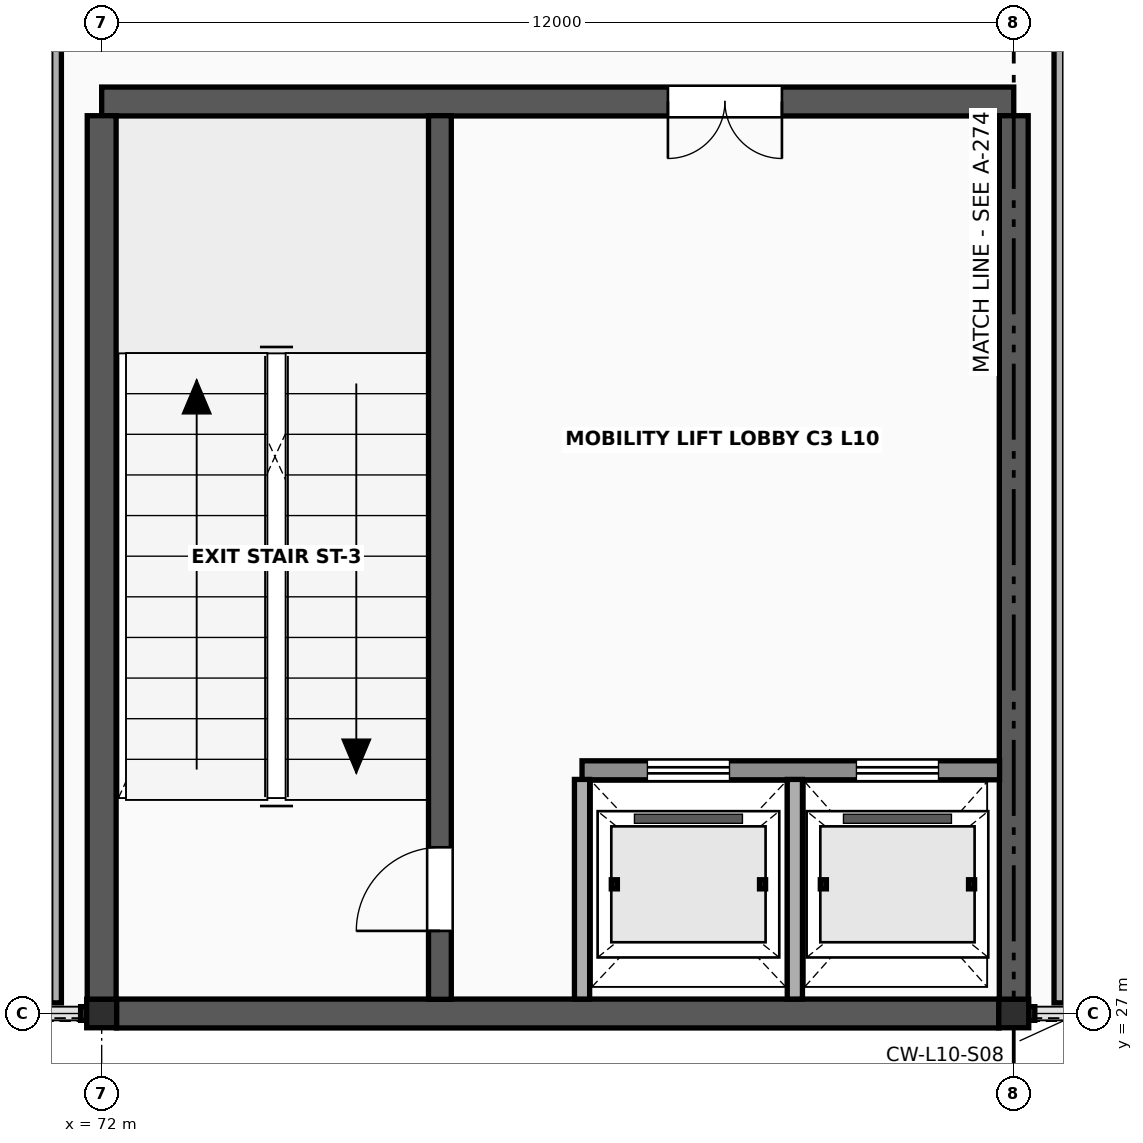
"""IFC4 building model, lengths in metres.
Left out: names, types, materials, properties, quantities, classifications, styles, units other than length and angle.
Written with IfcOpenShell. Run it as: python <this file> out.ifc"""

import sys

from ifc_helpers import new_model, si_unit, direction, frame, frame_2d, origin, origin_2d, place, context, subcontext, project, spatial, rectangle, i_section, extrude, element, fill, save


model = new_model("IFC4")
c1 = context("Model", 3, precision=1e-05, world=origin(), true_north=direction((0.0, 1.0)))
c2 = subcontext(c1, "Body", "Model", "MODEL_VIEW")
j1 = project(units=[si_unit("LENGTHUNIT", "METRE"), si_unit("PLANEANGLEUNIT", "RADIAN")], contexts=[c1])
p1 = place(None, origin())
s1 = spatial("IfcSite", under=j1, at=p1, CompositionType="ELEMENT")
p2 = place(p1, origin())
s2 = spatial("IfcBuilding", under=s1, at=p2, CompositionType="ELEMENT")
p3 = place(p2, frame((0.0, 0.0, 41.6)))
s3 = spatial("IfcBuildingStorey", under=s2, at=p3, CompositionType="ELEMENT", Elevation=41.6)
for number, where, z_axis, x_axis in (
    (1, (72.0, 27.0, 0.0), (0.0, 0.0, 1.0), (1.0, 0.0, 0.0)),
    (2, (84.0, 27.0, 0.0), (0.0, 0.0, 1.0), (1.0, 0.0, 0.0)),
):
    element("IfcColumn", number, at=place(p3, frame(where, z_axis=z_axis, x_axis=x_axis)), inside=s3, PredefinedType="COLUMN", context=c2, shape_type="SweptSolid", body=[
        extrude(i_section(OverallWidth=0.394, OverallDepth=0.375, WebThickness=0.017, FlangeThickness=0.028, FilletRadius=0.018, at=origin_2d()), origin(), (0.0, 0.0, 1.0), 4.0),
    ])
p4 = place(p3, frame((72.194, 27.0, 0.0), z_axis=(0.0, 0.0, 1.0), x_axis=(1.0, 0.0, 0.0)))
e3 = element("IfcWall", 3, at=p4, inside=s3, PredefinedType="SHEAR", context=c2, shape_type="SweptSolid", body=[
    extrude(rectangle(XDim=11.612, YDim=0.38, at=frame_2d((5.806, 0.0))), origin(), (0.0, 0.0, 1.0), 3.828),
])
p5 = place(p3, frame((72.0, 39.0, 0.0), z_axis=(0.0, 0.0, 1.0), x_axis=(1.0, 0.0, 0.0)))
e4 = element("IfcWall", 4, at=p5, inside=s3, PredefinedType="SHEAR", context=c2, shape_type="SweptSolid", body=[
    extrude(rectangle(XDim=12.0, YDim=0.38, at=frame_2d((6.0, 0.0))), origin(), (0.0, 0.0, 1.0), 3.828),
])
p6 = place(p5, frame((7.45, 0.0, 0.0)))
e5 = element("IfcOpeningElement", 5, at=p6, cuts=e4, PredefinedType="OPENING", context=c2, shape_type="SweptSolid", body=[
    extrude(rectangle(XDim=1.5, YDim=2.25, at=frame_2d((0.75, 1.125))), frame((0.0, 0.205, 0.0), z_axis=(0.0, -1.0, 0.0), x_axis=(1.0, 0.0, 0.0)), (0.0, 0.0, 1.0), 0.41),
])
for number, where, z_axis, x_axis in (
    (6, (72.0, 27.185, 0.0), (0.0, 0.0, 1.0), (0.0, 1.0, 0.0)),
    (7, (84.0, 27.185, 0.0), (0.0, 0.0, 1.0), (0.0, 1.0, 0.0)),
):
    element("IfcWall", number, at=place(p3, frame(where, z_axis=z_axis, x_axis=x_axis)), inside=s3, PredefinedType="SHEAR", context=c2, shape_type="SweptSolid", body=[
        extrude(rectangle(XDim=11.628, YDim=0.38, at=frame_2d((5.814, 0.0))), origin(), (0.0, 0.0, 1.0), 3.828),
    ])
p7 = place(p3, frame((76.45, 27.187, 0.0), z_axis=(0.0, 0.0, 1.0), x_axis=(0.0, 1.0, 0.0)))
e8 = element("IfcWall", 8, at=p7, inside=s3, PredefinedType="SHEAR", context=c2, shape_type="SweptSolid", body=[
    extrude(rectangle(XDim=11.626, YDim=0.3, at=frame_2d((5.813, 0.0))), origin(), (0.0, 0.0, 1.0), 3.828),
])
p8 = place(p7, frame((0.9, 0.0, 0.0)))
e9 = element("IfcOpeningElement", 9, at=p8, cuts=e8, PredefinedType="OPENING", context=c2, shape_type="SweptSolid", body=[
    extrude(rectangle(XDim=1.1, YDim=2.2, at=frame_2d((0.55, 1.1))), frame((0.0, 0.165, 0.0), z_axis=(0.0, -1.0, 0.0), x_axis=(1.0, 0.0, 0.0)), (0.0, 0.0, 1.0), 0.33),
])
p9 = place(p3, frame((78.32, 30.2, 0.0), z_axis=(0.0, 0.0, 1.0), x_axis=(1.0, 0.0, 0.0)))
e10 = element("IfcWall", 10, at=p9, inside=s3, PredefinedType="SOLIDWALL", context=c2, shape_type="SweptSolid", body=[
    extrude(rectangle(XDim=5.493, YDim=0.25, at=frame_2d((2.747, 0.0))), origin(), (0.0, 0.0, 1.0), 3.828),
])
p10 = place(p9, frame((0.86, 0.0, 0.0)))
e11 = element("IfcOpeningElement", 11, at=p10, cuts=e10, PredefinedType="OPENING", context=c2, shape_type="SweptSolid", body=[
    extrude(rectangle(XDim=1.08, YDim=2.22, at=frame_2d((0.54, 1.11))), frame((0.0, 0.14, 0.0), z_axis=(0.0, -1.0, 0.0), x_axis=(1.0, 0.0, 0.0)), (0.0, 0.0, 1.0), 0.28),
])
p11 = place(p9, frame((3.61, 0.0, 0.0)))
e12 = element("IfcOpeningElement", 12, at=p11, cuts=e10, PredefinedType="OPENING", context=c2, shape_type="SweptSolid", body=[
    extrude(rectangle(XDim=1.08, YDim=2.22, at=frame_2d((0.54, 1.11))), frame((0.0, 0.14, 0.0), z_axis=(0.0, -1.0, 0.0), x_axis=(1.0, 0.0, 0.0)), (0.0, 0.0, 1.0), 0.28),
])
for number, where, z_axis, x_axis in (
    (13, (78.32, 27.19, 0.0), (0.0, 0.0, 1.0), (0.0, 1.0, 0.0)),
    (14, (81.12, 27.19, 0.0), (0.0, 0.0, 1.0), (0.0, 1.0, 0.0)),
):
    element("IfcWall", number, at=place(p3, frame(where, z_axis=z_axis, x_axis=x_axis)), inside=s3, PredefinedType="SOLIDWALL", context=c2, shape_type="SweptSolid", body=[
        extrude(rectangle(XDim=2.89, YDim=0.2, at=frame_2d((1.445, 0.0))), origin(), (0.0, 0.0, 1.0), 3.818),
    ])
for number, where, z_axis, x_axis in (
    (15, (71.4, 27.14, 0.0), (0.0, 0.0, 1.0), (0.0, 1.0, 0.0)),
    (16, (84.6, 27.14, 0.0), (0.0, 0.0, 1.0), (0.0, 1.0, 0.0)),
):
    element("IfcWall", number, at=place(p3, frame(where, z_axis=z_axis, x_axis=x_axis)), inside=s3, PredefinedType="PARTITIONING", context=c2, shape_type="SweptSolid", body=[
        extrude(rectangle(XDim=25.7, YDim=0.14, at=frame_2d((12.85, 0.0))), origin(), (0.0, 0.0, 1.0), 2.88),
    ])
p12 = place(p8, origin())
e17 = element("IfcDoor", 17, at=p12, inside=s3, OperationType="SINGLE_SWING_LEFT", PredefinedType="DOOR", context=c2, shape_type="SweptSolid", body=[
    extrude(rectangle(XDim=1.1, YDim=2.2, at=frame_2d((0.55, 1.1))), frame((0.0, 0.025, 0.0), z_axis=(0.0, -1.0, 0.0), x_axis=(1.0, 0.0, 0.0)), (0.0, 0.0, 1.0), 0.05),
])
fill(e9, e17)
p13 = place(p6, origin())
e18 = element("IfcDoor", 18, at=p13, inside=s3, OperationType="DOUBLE_DOOR_SINGLE_SWING", PredefinedType="DOOR", context=c2, shape_type="SweptSolid", body=[
    extrude(rectangle(XDim=1.5, YDim=2.25, at=frame_2d((0.75, 1.125))), frame((0.0, 0.025, 0.0), z_axis=(0.0, -1.0, 0.0), x_axis=(1.0, 0.0, 0.0)), (0.0, 0.0, 1.0), 0.05),
])
fill(e5, e18)
p14 = place(p10, origin())
e19 = element("IfcDoor", 19, at=p14, inside=s3, OperationType="SLIDING_TO_LEFT", PredefinedType="USERDEFINED", context=c2, shape_type="SweptSolid", body=[
    extrude(rectangle(XDim=1.08, YDim=2.22, at=frame_2d((0.54, 1.11))), frame((0.0, 0.025, 0.0), z_axis=(0.0, -1.0, 0.0), x_axis=(1.0, 0.0, 0.0)), (0.0, 0.0, 1.0), 0.05),
])
fill(e11, e19)
p15 = place(p11, origin())
e20 = element("IfcDoor", 20, at=p15, inside=s3, OperationType="SLIDING_TO_LEFT", PredefinedType="USERDEFINED", context=c2, shape_type="SweptSolid", body=[
    extrude(rectangle(XDim=1.08, YDim=2.22, at=frame_2d((0.54, 1.11))), frame((0.0, 0.025, 0.0), z_axis=(0.0, -1.0, 0.0), x_axis=(1.0, 0.0, 0.0)), (0.0, 0.0, 1.0), 0.05),
])
fill(e12, e20)
save(model, sys.argv[1])
